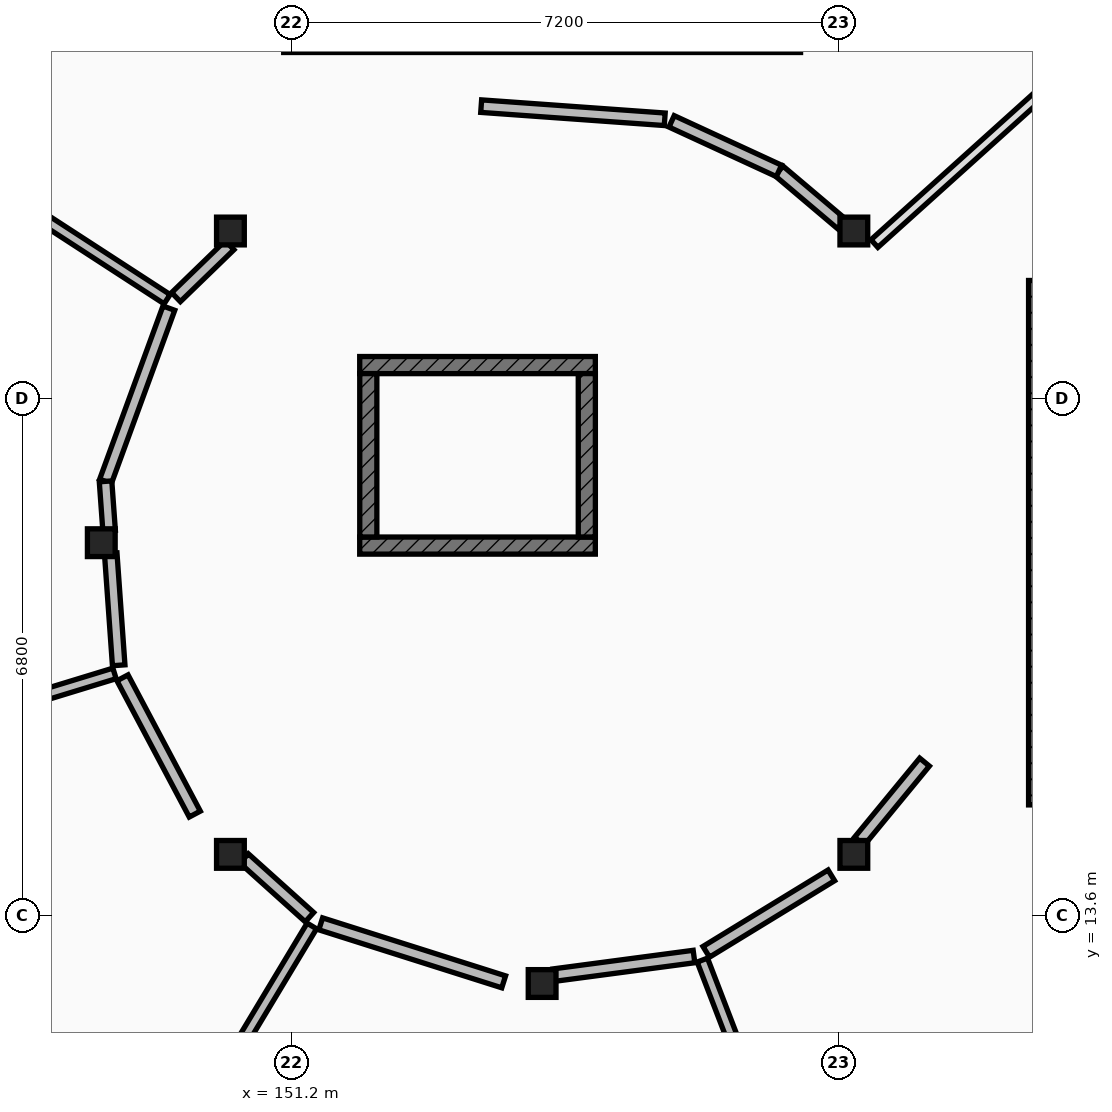
"""IFC4 building model, lengths in metres.
Left out: names, types, materials, properties, quantities, classifications, styles, units other than length and angle.
Written with IfcOpenShell. Run it as: python <this file> out.ifc"""

import sys

from ifc_helpers import new_model, si_unit, direction, frame, frame_2d, origin, origin_2d, place, context, subcontext, project, spatial, rectangle, extrude, element, fill, save


model = new_model("IFC4")
c1 = context("Model", 3, precision=1e-05, world=origin(), true_north=direction((0.0, 1.0)))
c2 = subcontext(c1, "Body", "Model", "MODEL_VIEW")
j1 = project(units=[si_unit("LENGTHUNIT", "METRE"), si_unit("PLANEANGLEUNIT", "RADIAN")], contexts=[c1])
p1 = place(None, origin())
s1 = spatial("IfcSite", under=j1, at=p1, CompositionType="ELEMENT")
p2 = place(p1, origin())
s2 = spatial("IfcBuilding", under=s1, at=p2, CompositionType="ELEMENT")
p3 = place(p2, origin())
s3 = spatial("IfcBuildingStorey", under=s2, at=p3, CompositionType="ELEMENT", Elevation=0.0)
for number, where, z_axis, x_axis in (
    (1, (158.601, 22.601, 0.0), (0.0, 0.0, 1.0), (1.0, 0.0, 0.0)),
    (2, (150.399, 22.601, 0.0), (0.0, 0.0, 1.0), (1.0, 0.0, 0.0)),
    (3, (148.7, 18.5, 0.0), (0.0, 0.0, 1.0), (1.0, 0.0, 0.0)),
    (4, (150.399, 14.399, 0.0), (0.0, 0.0, 1.0), (1.0, 0.0, 0.0)),
    (5, (154.5, 12.7, 0.0), (0.0, 0.0, 1.0), (1.0, 0.0, 0.0)),
    (6, (158.601, 14.399, 0.0), (0.0, 0.0, 1.0), (1.0, 0.0, 0.0)),
):
    element("IfcColumn", number, at=place(p3, frame(where, z_axis=z_axis, x_axis=x_axis)), inside=s3, PredefinedType="COLUMN", context=c2, shape_type="SweptSolid", body=[
        extrude(rectangle(XDim=0.365, YDim=0.365, at=origin_2d()), origin(), (0.0, 0.0, 1.0), 4.55),
    ])
p4 = place(p3, frame((161.025, 21.95, 0.0), z_axis=(0.0, 0.0, 1.0), x_axis=(0.0, -1.0, 0.0)))
e7 = element("IfcWall", 7, at=p4, inside=s3, PredefinedType="SHEAR", context=c2, shape_type="SweptSolid", body=[
    extrude(rectangle(XDim=6.9, YDim=0.25, at=frame_2d((3.45, 0.0))), origin(), (0.0, 0.0, 1.0), 4.305),
])
p5 = place(p4, frame((0.43, 0.0, 0.0)))
e8 = element("IfcOpeningElement", 8, at=p5, cuts=e7, PredefinedType="OPENING", context=c2, shape_type="SweptSolid", body=[
    extrude(rectangle(XDim=1.1, YDim=2.15, at=frame_2d((0.55, 1.075))), frame((0.0, 0.135, 0.0), z_axis=(0.0, -1.0, 0.0), x_axis=(1.0, 0.0, 0.0)), (0.0, 0.0, 1.0), 0.27),
])
p6 = place(p3, frame((152.1, 18.462, 0.0), z_axis=(0.0, 0.0, 1.0), x_axis=(1.0, 0.0, 0.0)))
e9 = element("IfcWall", 9, at=p6, inside=s3, PredefinedType="SHEAR", context=c2, shape_type="SweptSolid", body=[
    extrude(rectangle(XDim=3.1, YDim=0.225, at=frame_2d((1.55, 0.0))), origin(), (0.0, 0.0, 1.0), 4.305),
])
p7 = place(p6, frame((0.95, 0.0, 0.0)))
e10 = element("IfcOpeningElement", 10, at=p7, cuts=e9, PredefinedType="OPENING", context=c2, shape_type="SweptSolid", body=[
    extrude(rectangle(XDim=1.2, YDim=2.2, at=frame_2d((0.6, 1.1))), frame((0.0, 0.123, 0.0), z_axis=(0.0, -1.0, 0.0), x_axis=(1.0, 0.0, 0.0)), (0.0, 0.0, 1.0), 0.245),
])
p8 = place(p3, frame((152.1, 20.837, 0.0), z_axis=(0.0, 0.0, 1.0), x_axis=(1.0, 0.0, 0.0)))
e11 = element("IfcWall", 11, at=p8, inside=s3, PredefinedType="SHEAR", context=c2, shape_type="SweptSolid", body=[
    extrude(rectangle(XDim=3.1, YDim=0.225, at=frame_2d((1.55, 0.0))), origin(), (0.0, 0.0, 1.0), 4.305),
])
for number, where, z_axis, x_axis in (
    (12, (152.213, 18.575, 0.0), (0.0, 0.0, 1.0), (0.0, 1.0, 0.0)),
    (13, (155.088, 18.575, 0.0), (0.0, 0.0, 1.0), (0.0, 1.0, 0.0)),
):
    element("IfcWall", number, at=place(p3, frame(where, z_axis=z_axis, x_axis=x_axis)), inside=s3, PredefinedType="SHEAR", context=c2, shape_type="SweptSolid", body=[
        extrude(rectangle(XDim=2.15, YDim=0.225, at=frame_2d((1.075, 0.0))), origin(), (0.0, 0.0, 1.0), 4.305),
    ])
p9 = place(p3, frame((149.566, 21.704, 0.0), z_axis=(0.0, 0.0, 1.0), x_axis=(-0.838631802298, 0.544698724227, 0.0)))
e14 = element("IfcWall", 14, at=p9, inside=s3, PredefinedType="PARTITIONING", context=c2, shape_type="SweptSolid", body=[
    extrude(rectangle(XDim=4.208, YDim=0.145, at=frame_2d((2.104, 0.0))), origin(), (0.0, 0.0, 1.0), 3.634),
])
p10 = place(p3, frame((148.874, 16.78, 0.0), z_axis=(0.0, 0.0, 1.0), x_axis=(-0.956297390361, -0.292395795436, 0.0)))
e15 = element("IfcWall", 15, at=p10, inside=s3, PredefinedType="PARTITIONING", context=c2, shape_type="SweptSolid", body=[
    extrude(rectangle(XDim=4.864, YDim=0.145, at=frame_2d((2.432, 0.0))), origin(), (0.0, 0.0, 1.0), 3.634),
])
p11 = place(p3, frame((151.47, 13.457, 0.0), z_axis=(0.0, 0.0, 1.0), x_axis=(-0.515033199945, -0.857170229858, 0.0)))
e16 = element("IfcWall", 16, at=p11, inside=s3, PredefinedType="PARTITIONING", context=c2, shape_type="SweptSolid", body=[
    extrude(rectangle(XDim=4.007, YDim=0.145, at=frame_2d((2.004, 0.0))), origin(), (0.0, 0.0, 1.0), 3.634),
])
p12 = place(p3, frame((156.608, 13.008, 0.0), z_axis=(0.0, 0.0, 1.0), x_axis=(0.358370363431, -0.93357949989, 0.0)))
e17 = element("IfcWall", 17, at=p12, inside=s3, PredefinedType="PARTITIONING", context=c2, shape_type="SweptSolid", body=[
    extrude(rectangle(XDim=4.892, YDim=0.145, at=frame_2d((2.446, 0.0))), origin(), (0.0, 0.0, 1.0), 3.634),
])
p13 = place(p3, frame((158.872, 22.436, 0.0), z_axis=(0.0, 0.0, 1.0), x_axis=(0.743070024966, 0.669213671406, 0.0)))
e18 = element("IfcWall", 18, at=p13, inside=s3, PredefinedType="PLUMBINGWALL", context=c2, shape_type="SweptSolid", body=[
    extrude(rectangle(XDim=4.876, YDim=0.135, at=frame_2d((2.438, 0.0))), origin(), (0.0, 0.0, 1.0), 3.634),
])
p14 = place(p3, frame((156.113, 24.071, 0.0), z_axis=(0.0, 0.0, 1.0), x_axis=(-0.997448452595, 0.071390366401, 0.0)))
e19 = element("IfcWall", 19, at=p14, inside=s3, PredefinedType="PARTITIONING", context=c2, shape_type="SweptSolid", body=[
    extrude(rectangle(XDim=2.421, YDim=0.165, at=frame_2d((1.21, 0.0))), origin(), (0.0, 0.0, 1.0), 3.634),
])
p15 = place(p3, frame((150.388, 22.414, 0.0), z_axis=(0.0, 0.0, 1.0), x_axis=(-0.718088711181, -0.69595158084, 0.0)))
e20 = element("IfcWall", 20, at=p15, inside=s3, PredefinedType="PARTITIONING", context=c2, shape_type="SweptSolid", body=[
    extrude(rectangle(XDim=0.981, YDim=0.165, at=frame_2d((0.491, 0.0))), origin(), (0.0, 0.0, 1.0), 3.634),
])
p16 = place(p3, frame((149.589, 21.586, 0.0), z_axis=(0.0, 0.0, 1.0), x_axis=(-0.343293663048, -0.93922811974, 0.0)))
e21 = element("IfcWall", 21, at=p16, inside=s3, PredefinedType="PARTITIONING", context=c2, shape_type="SweptSolid", body=[
    extrude(rectangle(XDim=2.427, YDim=0.165, at=frame_2d((1.213, 0.0))), origin(), (0.0, 0.0, 1.0), 3.634),
])
p17 = place(p16, frame((0.703, 0.0, 0.0)))
e22 = element("IfcOpeningElement", 22, at=p17, cuts=e21, PredefinedType="OPENING", context=c2, shape_type="SweptSolid", body=[
    extrude(rectangle(XDim=1.02, YDim=2.2, at=frame_2d((0.51, 1.1))), frame((0.0, 0.093, 0.0), z_axis=(0.0, -1.0, 0.0), x_axis=(1.0, 0.0, 0.0)), (0.0, 0.0, 1.0), 0.185),
])
p18 = place(p3, frame((148.756, 19.307, 0.0), z_axis=(0.0, 0.0, 1.0), x_axis=(0.071939342489, -0.997409008884, 0.0)))
e23 = element("IfcWall", 23, at=p18, inside=s3, PredefinedType="PARTITIONING", context=c2, shape_type="SweptSolid", body=[
    extrude(rectangle(XDim=0.652, YDim=0.165, at=frame_2d((0.326, 0.0))), origin(), (0.0, 0.0, 1.0), 3.634),
])
p19 = place(p3, frame((148.824, 18.36, 0.0), z_axis=(0.0, 0.0, 1.0), x_axis=(0.071082579823, -0.997470434071, 0.0)))
e24 = element("IfcWall", 24, at=p19, inside=s3, PredefinedType="PARTITIONING", context=c2, shape_type="SweptSolid", body=[
    extrude(rectangle(XDim=1.477, YDim=0.165, at=frame_2d((0.738, 0.0))), origin(), (0.0, 0.0, 1.0), 3.634),
])
p20 = place(p3, frame((148.979, 16.722, 0.0), z_axis=(0.0, 0.0, 1.0), x_axis=(0.468545306674, -0.883439469117, 0.0)))
e25 = element("IfcWall", 25, at=p20, inside=s3, PredefinedType="PARTITIONING", context=c2, shape_type="SweptSolid", body=[
    extrude(rectangle(XDim=2.03, YDim=0.165, at=frame_2d((1.015, 0.0))), origin(), (0.0, 0.0, 1.0), 3.634),
])
p21 = place(p20, frame((0.505, 0.0, 0.0)))
e26 = element("IfcOpeningElement", 26, at=p21, cuts=e25, PredefinedType="OPENING", context=c2, shape_type="SweptSolid", body=[
    extrude(rectangle(XDim=1.02, YDim=2.2, at=frame_2d((0.51, 1.1))), frame((0.0, 0.093, 0.0), z_axis=(0.0, -1.0, 0.0), x_axis=(1.0, 0.0, 0.0)), (0.0, 0.0, 1.0), 0.185),
])
p22 = place(p3, frame((150.579, 14.346, 0.0), z_axis=(0.0, 0.0, 1.0), x_axis=(0.743692994732, -0.668521300773, 0.0)))
e27 = element("IfcWall", 27, at=p22, inside=s3, PredefinedType="PARTITIONING", context=c2, shape_type="SweptSolid", body=[
    extrude(rectangle(XDim=1.156, YDim=0.165, at=frame_2d((0.578, 0.0))), origin(), (0.0, 0.0, 1.0), 3.634),
])
p23 = place(p3, frame((151.587, 13.485, 0.0), z_axis=(0.0, 0.0, 1.0), x_axis=(0.953231317115, -0.302241717953, 0.0)))
e28 = element("IfcWall", 28, at=p23, inside=s3, PredefinedType="PARTITIONING", context=c2, shape_type="SweptSolid", body=[
    extrude(rectangle(XDim=2.525, YDim=0.165, at=frame_2d((1.263, 0.0))), origin(), (0.0, 0.0, 1.0), 3.634),
])
p24 = place(p23, frame((0.708, 0.0, 0.0)))
e29 = element("IfcOpeningElement", 29, at=p24, cuts=e28, PredefinedType="OPENING", context=c2, shape_type="SweptSolid", body=[
    extrude(rectangle(XDim=1.11, YDim=2.25, at=frame_2d((0.555, 1.125))), frame((0.0, 0.093, 0.0), z_axis=(0.0, -1.0, 0.0), x_axis=(1.0, 0.0, 0.0)), (0.0, 0.0, 1.0), 0.185),
])
p25 = place(p3, frame((154.652, 12.81, 0.0), z_axis=(0.0, 0.0, 1.0), x_axis=(0.991315849542, 0.13150241993, 0.0)))
e30 = element("IfcWall", 30, at=p25, inside=s3, PredefinedType="PARTITIONING", context=c2, shape_type="SweptSolid", body=[
    extrude(rectangle(XDim=1.862, YDim=0.165, at=frame_2d((0.931, 0.0))), origin(), (0.0, 0.0, 1.0), 3.634),
])
p26 = place(p3, frame((156.659, 13.117, 0.0), z_axis=(0.0, 0.0, 1.0), x_axis=(0.853231776627, 0.521531912115, 0.0)))
e31 = element("IfcWall", 31, at=p26, inside=s3, PredefinedType="PARTITIONING", context=c2, shape_type="SweptSolid", body=[
    extrude(rectangle(XDim=1.929, YDim=0.165, at=frame_2d((0.965, 0.0))), origin(), (0.0, 0.0, 1.0), 3.634),
])
p27 = place(p26, frame((0.455, 0.0, 0.0)))
e32 = element("IfcOpeningElement", 32, at=p27, cuts=e31, PredefinedType="OPENING", context=c2, shape_type="SweptSolid", body=[
    extrude(rectangle(XDim=1.02, YDim=2.2, at=frame_2d((0.51, 1.1))), frame((0.0, 0.093, 0.0), z_axis=(0.0, -1.0, 0.0), x_axis=(1.0, 0.0, 0.0)), (0.0, 0.0, 1.0), 0.185),
])
p28 = place(p3, frame((158.674, 14.572, 0.0), z_axis=(0.0, 0.0, 1.0), x_axis=(0.635542225464, 0.772066110934, 0.0)))
e33 = element("IfcWall", 33, at=p28, inside=s3, PredefinedType="PARTITIONING", context=c2, shape_type="SweptSolid", body=[
    extrude(rectangle(XDim=1.348, YDim=0.165, at=frame_2d((0.674, 0.0))), origin(), (0.0, 0.0, 1.0), 3.634),
])
p29 = place(p3, frame((158.439, 22.696, 0.0), z_axis=(0.0, 0.0, 1.0), x_axis=(-0.763540910225, 0.645759458633, 0.0)))
e34 = element("IfcWall", 34, at=p29, inside=s3, PredefinedType="PARTITIONING", context=c2, shape_type="SweptSolid", body=[
    extrude(rectangle(XDim=1.078, YDim=0.165, at=frame_2d((0.539, 0.0))), origin(), (0.0, 0.0, 1.0), 3.634),
])
p30 = place(p3, frame((157.616, 23.392, 0.0), z_axis=(0.0, 0.0, 1.0), x_axis=(-0.908042017689, 0.418879092472, 0.0)))
e35 = element("IfcWall", 35, at=p30, inside=s3, PredefinedType="PARTITIONING", context=c2, shape_type="SweptSolid", body=[
    extrude(rectangle(XDim=1.556, YDim=0.165, at=frame_2d((0.778, 0.0))), origin(), (0.0, 0.0, 1.0), 3.634),
])
p31 = place(p30, frame((0.328, 0.0, 0.0)))
e36 = element("IfcOpeningElement", 36, at=p31, cuts=e35, PredefinedType="OPENING", context=c2, shape_type="SweptSolid", body=[
    extrude(rectangle(XDim=0.9, YDim=2.1, at=frame_2d((0.45, 1.05))), frame((0.0, 0.093, 0.0), z_axis=(0.0, -1.0, 0.0), x_axis=(1.0, 0.0, 0.0)), (0.0, 0.0, 1.0), 0.185),
])
p32 = place(p7, origin())
e37 = element("IfcDoor", 37, at=p32, inside=s3, OperationType="DOUBLE_DOOR_SLIDING", PredefinedType="DOOR", context=c2, shape_type="SweptSolid", body=[
    extrude(rectangle(XDim=1.2, YDim=2.2, at=frame_2d((0.6, 1.1))), frame((0.0, 0.025, 0.0), z_axis=(0.0, -1.0, 0.0), x_axis=(1.0, 0.0, 0.0)), (0.0, 0.0, 1.0), 0.05),
])
fill(e10, e37)
p33 = place(p17, origin())
e38 = element("IfcDoor", 38, at=p33, inside=s3, OperationType="SINGLE_SWING_LEFT", PredefinedType="DOOR", context=c2, shape_type="SweptSolid", body=[
    extrude(rectangle(XDim=1.02, YDim=2.2, at=frame_2d((0.51, 1.1))), frame((0.0, 0.025, 0.0), z_axis=(0.0, -1.0, 0.0), x_axis=(1.0, 0.0, 0.0)), (0.0, 0.0, 1.0), 0.05),
])
fill(e22, e38)
p34 = place(p21, origin())
e39 = element("IfcDoor", 39, at=p34, inside=s3, OperationType="SINGLE_SWING_RIGHT", PredefinedType="DOOR", context=c2, shape_type="SweptSolid", body=[
    extrude(rectangle(XDim=1.02, YDim=2.2, at=frame_2d((0.51, 1.1))), frame((0.0, 0.025, 0.0), z_axis=(0.0, -1.0, 0.0), x_axis=(1.0, 0.0, 0.0)), (0.0, 0.0, 1.0), 0.05),
])
fill(e26, e39)
p35 = place(p24, origin())
e40 = element("IfcDoor", 40, at=p35, inside=s3, OperationType="SINGLE_SWING_LEFT", PredefinedType="DOOR", context=c2, shape_type="SweptSolid", body=[
    extrude(rectangle(XDim=1.11, YDim=2.25, at=frame_2d((0.555, 1.125))), frame((0.0, 0.025, 0.0), z_axis=(0.0, -1.0, 0.0), x_axis=(1.0, 0.0, 0.0)), (0.0, 0.0, 1.0), 0.05),
])
fill(e29, e40)
p36 = place(p27, origin())
e41 = element("IfcDoor", 41, at=p36, inside=s3, OperationType="SINGLE_SWING_RIGHT", PredefinedType="DOOR", context=c2, shape_type="SweptSolid", body=[
    extrude(rectangle(XDim=1.02, YDim=2.2, at=frame_2d((0.51, 1.1))), frame((0.0, 0.025, 0.0), z_axis=(0.0, -1.0, 0.0), x_axis=(1.0, 0.0, 0.0)), (0.0, 0.0, 1.0), 0.05),
])
fill(e32, e41)
p37 = place(p31, origin())
e42 = element("IfcDoor", 42, at=p37, inside=s3, OperationType="SINGLE_SWING_LEFT", PredefinedType="DOOR", context=c2, shape_type="SweptSolid", body=[
    extrude(rectangle(XDim=0.9, YDim=2.1, at=frame_2d((0.45, 1.05))), frame((0.0, 0.025, 0.0), z_axis=(0.0, -1.0, 0.0), x_axis=(1.0, 0.0, 0.0)), (0.0, 0.0, 1.0), 0.05),
])
fill(e36, e42)
save(model, sys.argv[1])
